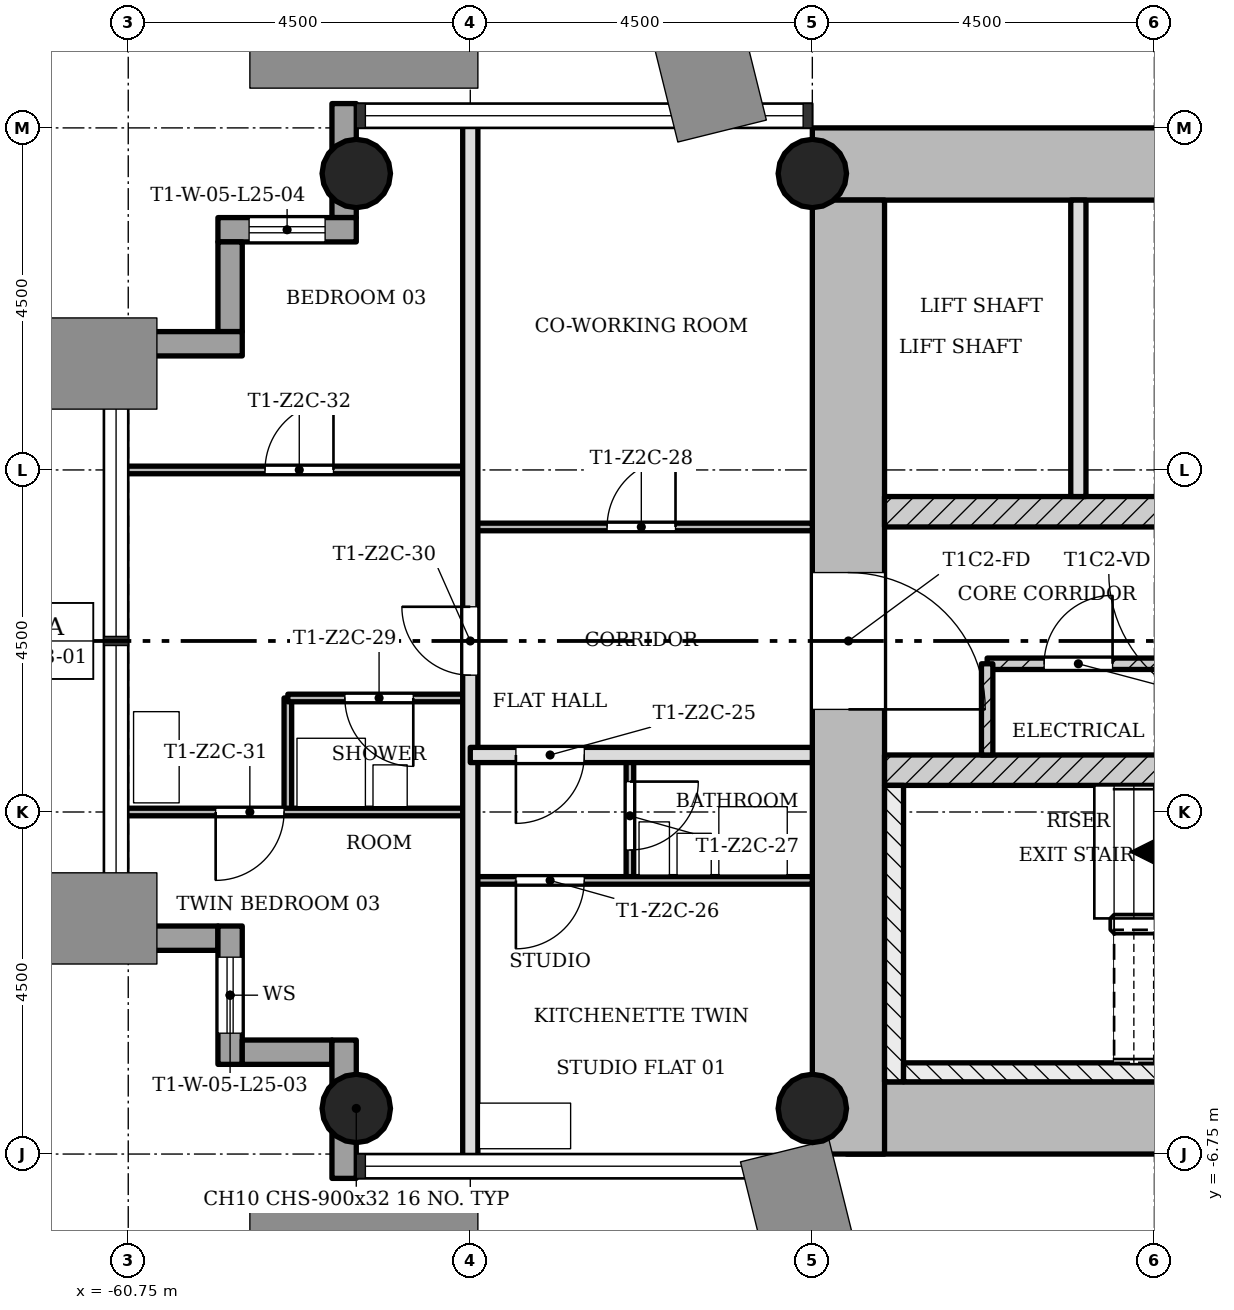
"""IFC4 building model, lengths in metres.
Left out: names, types, materials, properties, quantities, classifications, styles, units other than length and angle.
Written with IfcOpenShell. Run it as: python <this file> out.ifc"""

import sys

from ifc_helpers import new_model, si_unit, direction, frame, frame_2d, origin, origin_2d, place, context, subcontext, project, spatial, rectangle, hollow_circle, extrude, element, fill, save


model = new_model("IFC4")
c1 = context("Model", 3, precision=1e-05, world=origin(), true_north=direction((0.0, 1.0)))
c2 = subcontext(c1, "Body", "Model", "MODEL_VIEW")
j1 = project(units=[si_unit("LENGTHUNIT", "METRE"), si_unit("PLANEANGLEUNIT", "RADIAN")], contexts=[c1])
p1 = place(None, origin())
s1 = spatial("IfcSite", under=j1, at=p1, CompositionType="ELEMENT")
p2 = place(p1, origin())
s2 = spatial("IfcBuilding", under=s1, at=p2, CompositionType="ELEMENT")
p3 = place(p2, frame((0.0, 0.0, 93.6)))
s3 = spatial("IfcBuildingStorey", under=s2, at=p3, CompositionType="ELEMENT", Elevation=93.6)
p4 = place(p3, frame((-51.298, -6.275, 0.0), z_axis=(0.0, 0.0, 1.0), x_axis=(1.0, 0.0, 0.0)))
e1 = element("IfcWall", 1, at=p4, inside=s3, PredefinedType="SHEAR", context=c2, shape_type="SweptSolid", body=[
    extrude(rectangle(XDim=8.696, YDim=0.95, at=frame_2d((4.348, 0.0))), origin(), (0.0, 0.0, 1.0), 3.4),
])
p5 = place(p3, frame((-43.7, 6.275, 0.0), z_axis=(0.0, 0.0, 1.0), x_axis=(-1.0, 0.0, 0.0)))
e2 = element("IfcWall", 2, at=p5, inside=s3, PredefinedType="SHEAR", context=c2, shape_type="SweptSolid", body=[
    extrude(rectangle(XDim=8.05, YDim=0.95, at=frame_2d((4.025, 0.0))), origin(), (0.0, 0.0, 1.0), 3.4),
])
p6 = place(p3, frame((-51.275, 5.8, 0.0), z_axis=(0.0, 0.0, 1.0), x_axis=(0.0, -1.0, 0.0)))
e3 = element("IfcWall", 3, at=p6, inside=s3, PredefinedType="SHEAR", context=c2, shape_type="SweptSolid", body=[
    extrude(rectangle(XDim=12.55, YDim=0.95, at=frame_2d((6.275, 0.0))), origin(), (0.0, 0.0, 1.0), 3.4),
])
p7 = place(p6, frame((4.9, 0.0, 0.0)))
e4 = element("IfcOpeningElement", 4, at=p7, cuts=e3, PredefinedType="OPENING", context=c2, shape_type="SweptSolid", body=[
    extrude(rectangle(XDim=1.8, YDim=2.1, at=frame_2d((0.9, 1.05))), frame((0.0, 0.485, 0.0), z_axis=(0.0, -1.0, 0.0), x_axis=(1.0, 0.0, 0.0)), (0.0, 0.0, 1.0), 0.97),
])
p8 = place(p3, frame((-50.8, -1.7, 0.0), z_axis=(0.0, 0.0, 1.0), x_axis=(1.0, 0.0, 0.0)))
e5 = element("IfcWall", 5, at=p8, inside=s3, PredefinedType="SHEAR", context=c2, shape_type="SweptSolid", body=[
    extrude(rectangle(XDim=7.1, YDim=0.4, at=frame_2d((3.55, 0.0))), origin(), (0.0, 0.0, 1.0), 3.4),
])
p9 = place(p8, frame((5.5, 0.0, 0.0)))
e6 = element("IfcOpeningElement", 6, at=p9, cuts=e5, PredefinedType="OPENING", context=c2, shape_type="SweptSolid", body=[
    extrude(rectangle(XDim=0.9, YDim=2.1, at=frame_2d((0.45, 1.05))), frame((0.0, 0.21, 0.0), z_axis=(0.0, -1.0, 0.0), x_axis=(1.0, 0.0, 0.0)), (0.0, 0.0, 1.0), 0.42),
])
p10 = place(p3, frame((-50.8, 1.7, 0.0), z_axis=(0.0, 0.0, 1.0), x_axis=(1.0, 0.0, 0.0)))
e7 = element("IfcWall", 7, at=p10, inside=s3, PredefinedType="SHEAR", context=c2, shape_type="SweptSolid", body=[
    extrude(rectangle(XDim=7.1, YDim=0.4, at=frame_2d((3.55, 0.0))), origin(), (0.0, 0.0, 1.0), 3.4),
])
p11 = place(p10, frame((5.2, 0.0, 0.0)))
e8 = element("IfcOpeningElement", 8, at=p11, cuts=e7, PredefinedType="OPENING", context=c2, shape_type="SweptSolid", body=[
    extrude(rectangle(XDim=1.1, YDim=2.1, at=frame_2d((0.55, 1.05))), frame((0.0, 0.21, 0.0), z_axis=(0.0, -1.0, 0.0), x_axis=(1.0, 0.0, 0.0)), (0.0, 0.0, 1.0), 0.42),
])
for number, where, z_axis, x_axis in (
    (9, (-51.75, -6.15, 0.0), (0.0, 0.0, 1.0), (1.0, 0.0, 0.0)),
    (10, (-51.75, 6.15, 0.0), (0.0, 0.0, 1.0), (1.0, 0.0, 0.0)),
    (11, (-57.75, -6.15, 0.0), (0.0, 0.0, 1.0), (1.0, 0.0, 0.0)),
    (12, (-57.75, 6.15, 0.0), (0.0, 0.0, 1.0), (1.0, 0.0, 0.0)),
):
    element("IfcColumn", number, at=place(p3, frame(where, z_axis=z_axis, x_axis=x_axis)), inside=s3, PredefinedType="COLUMN", context=c2, shape_type="SweptSolid", body=[
        extrude(hollow_circle(Radius=0.45, WallThickness=0.032, at=origin_2d()), origin(), (0.0, 0.0, 1.0), 3.4),
    ])
p12 = place(p3, frame((-61.07, -3.91, -0.3), z_axis=(0.0, 0.0, 1.0), x_axis=(1.0, 0.0, 0.0)))
e13 = element("IfcWall", 13, at=p12, inside=s3, PredefinedType="STANDARD", context=c2, shape_type="SweptSolid", body=[
    extrude(rectangle(XDim=1.5, YDim=0.32, at=frame_2d((0.75, 0.0))), origin(), (0.0, 0.0, 1.0), 3.4),
])
p13 = place(p3, frame((-59.41, -3.75, -0.3), z_axis=(0.0, 0.0, 1.0), x_axis=(0.0, -1.0, 0.0)))
e14 = element("IfcWall", 14, at=p13, inside=s3, PredefinedType="STANDARD", context=c2, shape_type="SweptSolid", body=[
    extrude(rectangle(XDim=1.82, YDim=0.32, at=frame_2d((0.91, 0.0))), origin(), (0.0, 0.0, 1.0), 3.4),
])
p14 = place(p13, frame((0.41, 0.0, 1.2)))
e15 = element("IfcOpeningElement", 15, at=p14, cuts=e14, PredefinedType="OPENING", context=c2, shape_type="SweptSolid", body=[
    extrude(rectangle(XDim=1.0, YDim=1.5, at=frame_2d((0.5, 0.75))), frame((0.0, 0.17, 0.0), z_axis=(0.0, -1.0, 0.0), x_axis=(1.0, 0.0, 0.0)), (0.0, 0.0, 1.0), 0.34),
])
p15 = place(p3, frame((-59.25, -5.41, -0.3), z_axis=(0.0, 0.0, 1.0), x_axis=(1.0, 0.0, 0.0)))
e16 = element("IfcWall", 16, at=p15, inside=s3, PredefinedType="STANDARD", context=c2, shape_type="SweptSolid", body=[
    extrude(rectangle(XDim=1.18, YDim=0.32, at=frame_2d((0.59, 0.0))), origin(), (0.0, 0.0, 1.0), 3.4),
])
p16 = place(p3, frame((-57.91, -5.25, -0.3), z_axis=(0.0, 0.0, 1.0), x_axis=(0.0, -1.0, 0.0)))
e17 = element("IfcWall", 17, at=p16, inside=s3, PredefinedType="STANDARD", context=c2, shape_type="SweptSolid", body=[
    extrude(rectangle(XDim=1.82, YDim=0.32, at=frame_2d((0.91, 0.0))), origin(), (0.0, 0.0, 1.0), 3.4),
])
p17 = place(p3, frame((-57.91, 7.07, -0.3), z_axis=(0.0, 0.0, 1.0), x_axis=(0.0, -1.0, 0.0)))
e18 = element("IfcWall", 18, at=p17, inside=s3, PredefinedType="STANDARD", context=c2, shape_type="SweptSolid", body=[
    extrude(rectangle(XDim=1.5, YDim=0.32, at=frame_2d((0.75, 0.0))), origin(), (0.0, 0.0, 1.0), 3.4),
])
p18 = place(p3, frame((-57.75, 5.41, -0.3), z_axis=(0.0, 0.0, 1.0), x_axis=(-1.0, 0.0, 0.0)))
e19 = element("IfcWall", 19, at=p18, inside=s3, PredefinedType="STANDARD", context=c2, shape_type="SweptSolid", body=[
    extrude(rectangle(XDim=1.82, YDim=0.32, at=frame_2d((0.91, 0.0))), origin(), (0.0, 0.0, 1.0), 3.4),
])
p19 = place(p18, frame((0.41, 0.0, 1.2)))
e20 = element("IfcOpeningElement", 20, at=p19, cuts=e19, PredefinedType="OPENING", context=c2, shape_type="SweptSolid", body=[
    extrude(rectangle(XDim=1.0, YDim=1.5, at=frame_2d((0.5, 0.75))), frame((0.0, 0.17, 0.0), z_axis=(0.0, -1.0, 0.0), x_axis=(1.0, 0.0, 0.0)), (0.0, 0.0, 1.0), 0.34),
])
p20 = place(p3, frame((-59.41, 5.25, -0.3), z_axis=(0.0, 0.0, 1.0), x_axis=(0.0, -1.0, 0.0)))
e21 = element("IfcWall", 21, at=p20, inside=s3, PredefinedType="STANDARD", context=c2, shape_type="SweptSolid", body=[
    extrude(rectangle(XDim=1.18, YDim=0.32, at=frame_2d((0.59, 0.0))), origin(), (0.0, 0.0, 1.0), 3.4),
])
p21 = place(p3, frame((-59.25, 3.91, -0.3), z_axis=(0.0, 0.0, 1.0), x_axis=(-1.0, 0.0, 0.0)))
e22 = element("IfcWall", 22, at=p21, inside=s3, PredefinedType="STANDARD", context=c2, shape_type="SweptSolid", body=[
    extrude(rectangle(XDim=1.82, YDim=0.32, at=frame_2d((0.91, 0.0))), origin(), (0.0, 0.0, 1.0), 3.4),
])
p22 = place(p3, frame((-48.25, 5.8, 0.0), z_axis=(0.0, 0.0, 1.0), x_axis=(0.0, -1.0, 0.0)))
e23 = element("IfcWall", 23, at=p22, inside=s3, PredefinedType="SOLIDWALL", context=c2, shape_type="SweptSolid", body=[
    extrude(rectangle(XDim=3.9, YDim=0.2, at=frame_2d((1.95, 0.0))), origin(), (0.0, 0.0, 1.0), 3.0),
])
p23 = place(p3, frame((-47.05, -0.3, 0.0), z_axis=(0.0, 0.0, 1.0), x_axis=(-1.0, 0.0, 0.0)))
e24 = element("IfcWall", 24, at=p23, inside=s3, PredefinedType="PARTITIONING", context=c2, shape_type="SweptSolid", body=[
    extrude(rectangle(XDim=2.4, YDim=0.15, at=frame_2d((1.2, 0.0))), origin(), (0.0, 0.0, 1.0), 3.0),
])
p24 = place(p23, frame((0.75, 0.0, 0.0)))
e25 = element("IfcOpeningElement", 25, at=p24, cuts=e24, PredefinedType="OPENING", context=c2, shape_type="SweptSolid", body=[
    extrude(rectangle(XDim=0.9, YDim=2.1, at=frame_2d((0.45, 1.05))), frame((0.0, 0.085, 0.0), z_axis=(0.0, -1.0, 0.0), x_axis=(1.0, 0.0, 0.0)), (0.0, 0.0, 1.0), 0.17),
])
p25 = place(p3, frame((-49.45, -0.3, 0.0), z_axis=(0.0, 0.0, 1.0), x_axis=(0.0, -1.0, 0.0)))
e26 = element("IfcWall", 26, at=p25, inside=s3, PredefinedType="PARTITIONING", context=c2, shape_type="SweptSolid", body=[
    extrude(rectangle(XDim=1.2, YDim=0.15, at=frame_2d((0.6, 0.0))), origin(), (0.0, 0.0, 1.0), 3.0),
])
p26 = place(p3, frame((-58.65, -2.25, 0.0), z_axis=(0.0, 0.0, 1.0), x_axis=(0.0, 1.0, 0.0)))
e27 = element("IfcWall", 27, at=p26, inside=s3, PredefinedType="PARTITIONING", context=c2, shape_type="SweptSolid", body=[
    extrude(rectangle(XDim=1.5, YDim=0.1, at=frame_2d((0.75, 0.0))), origin(), (0.0, 0.0, 1.0), 3.0),
])
p27 = place(p3, frame((-56.25, -6.85, 0.0), z_axis=(0.0, 0.0, 1.0), x_axis=(0.0, 1.0, 0.0)))
e28 = element("IfcWall", 28, at=p27, inside=s3, PredefinedType="SOLIDWALL", context=c2, shape_type="SweptSolid", body=[
    extrude(rectangle(XDim=13.7, YDim=0.2, at=frame_2d((6.85, 0.0))), origin(), (0.0, 0.0, 1.0), 3.0),
])
p28 = place(p27, frame((6.4, 0.0, 0.0)))
e29 = element("IfcOpeningElement", 29, at=p28, cuts=e28, PredefinedType="OPENING", context=c2, shape_type="SweptSolid", body=[
    extrude(rectangle(XDim=0.9, YDim=2.1, at=frame_2d((0.45, 1.05))), frame((0.0, 0.11, 0.0), z_axis=(0.0, -1.0, 0.0), x_axis=(1.0, 0.0, 0.0)), (0.0, 0.0, 1.0), 0.22),
])
p29 = place(p3, frame((-54.15, -3.15, 0.0), z_axis=(0.0, 0.0, 1.0), x_axis=(0.0, 1.0, 0.0)))
e30 = element("IfcWall", 30, at=p29, inside=s3, PredefinedType="PARTITIONING", context=c2, shape_type="SweptSolid", body=[
    extrude(rectangle(XDim=1.65, YDim=0.1, at=frame_2d((0.825, 0.0))), origin(), (0.0, 0.0, 1.0), 3.0),
])
p30 = place(p29, frame((0.4, 0.0, 0.0)))
e31 = element("IfcOpeningElement", 31, at=p30, cuts=e30, PredefinedType="OPENING", context=c2, shape_type="SweptSolid", body=[
    extrude(rectangle(XDim=0.9, YDim=2.1, at=frame_2d((0.45, 1.05))), frame((0.0, 0.06, 0.0), z_axis=(0.0, -1.0, 0.0), x_axis=(1.0, 0.0, 0.0)), (0.0, 0.0, 1.0), 0.12),
])
p31 = place(p3, frame((-56.25, -3.15, 0.0), z_axis=(0.0, 0.0, 1.0), x_axis=(1.0, 0.0, 0.0)))
e32 = element("IfcWall", 32, at=p31, inside=s3, PredefinedType="PARTITIONING", context=c2, shape_type="SweptSolid", body=[
    extrude(rectangle(XDim=4.5, YDim=0.1, at=frame_2d((2.25, 0.0))), origin(), (0.0, 0.0, 1.0), 3.0),
])
p32 = place(p31, frame((0.6, 0.0, 0.0)))
e33 = element("IfcOpeningElement", 33, at=p32, cuts=e32, PredefinedType="OPENING", context=c2, shape_type="SweptSolid", body=[
    extrude(rectangle(XDim=0.9, YDim=2.1, at=frame_2d((0.45, 1.05))), frame((0.0, 0.06, 0.0), z_axis=(0.0, -1.0, 0.0), x_axis=(1.0, 0.0, 0.0)), (0.0, 0.0, 1.0), 0.12),
])
p33 = place(p3, frame((-60.85, -2.25, 0.0), z_axis=(0.0, 0.0, 1.0), x_axis=(1.0, 0.0, 0.0)))
e34 = element("IfcWall", 34, at=p33, inside=s3, PredefinedType="PARTITIONING", context=c2, shape_type="SweptSolid", body=[
    extrude(rectangle(XDim=4.6, YDim=0.1, at=frame_2d((2.3, 0.0))), origin(), (0.0, 0.0, 1.0), 3.0),
])
p34 = place(p33, frame((1.25, 0.0, 0.0)))
e35 = element("IfcOpeningElement", 35, at=p34, cuts=e34, PredefinedType="OPENING", context=c2, shape_type="SweptSolid", body=[
    extrude(rectangle(XDim=0.9, YDim=2.1, at=frame_2d((0.45, 1.05))), frame((0.0, 0.06, 0.0), z_axis=(0.0, -1.0, 0.0), x_axis=(1.0, 0.0, 0.0)), (0.0, 0.0, 1.0), 0.12),
])
p35 = place(p3, frame((-56.25, -1.5, 0.0), z_axis=(0.0, 0.0, 1.0), x_axis=(1.0, 0.0, 0.0)))
e36 = element("IfcWall", 36, at=p35, inside=s3, PredefinedType="SOLIDWALL", context=c2, shape_type="SweptSolid", body=[
    extrude(rectangle(XDim=4.5, YDim=0.2, at=frame_2d((2.25, 0.0))), origin(), (0.0, 0.0, 1.0), 3.0),
])
p36 = place(p35, frame((0.6, 0.0, 0.0)))
e37 = element("IfcOpeningElement", 37, at=p36, cuts=e36, PredefinedType="OPENING", context=c2, shape_type="SweptSolid", body=[
    extrude(rectangle(XDim=0.9, YDim=2.1, at=frame_2d((0.45, 1.05))), frame((0.0, 0.11, 0.0), z_axis=(0.0, -1.0, 0.0), x_axis=(1.0, 0.0, 0.0)), (0.0, 0.0, 1.0), 0.22),
])
p37 = place(p3, frame((-58.65, -0.75, 0.0), z_axis=(0.0, 0.0, 1.0), x_axis=(1.0, 0.0, 0.0)))
e38 = element("IfcWall", 38, at=p37, inside=s3, PredefinedType="PARTITIONING", context=c2, shape_type="SweptSolid", body=[
    extrude(rectangle(XDim=2.4, YDim=0.1, at=frame_2d((1.2, 0.0))), origin(), (0.0, 0.0, 1.0), 3.0),
])
p38 = place(p37, frame((0.75, 0.0, 0.0)))
e39 = element("IfcOpeningElement", 39, at=p38, cuts=e38, PredefinedType="OPENING", context=c2, shape_type="SweptSolid", body=[
    extrude(rectangle(XDim=0.9, YDim=2.1, at=frame_2d((0.45, 1.05))), frame((0.0, 0.06, 0.0), z_axis=(0.0, -1.0, 0.0), x_axis=(1.0, 0.0, 0.0)), (0.0, 0.0, 1.0), 0.12),
])
p39 = place(p3, frame((-56.25, 1.5, 0.0), z_axis=(0.0, 0.0, 1.0), x_axis=(1.0, 0.0, 0.0)))
e40 = element("IfcWall", 40, at=p39, inside=s3, PredefinedType="PARTITIONING", context=c2, shape_type="SweptSolid", body=[
    extrude(rectangle(XDim=4.5, YDim=0.1, at=frame_2d((2.25, 0.0))), origin(), (0.0, 0.0, 1.0), 3.0),
])
p40 = place(p39, frame((1.8, 0.0, 0.0)))
e41 = element("IfcOpeningElement", 41, at=p40, cuts=e40, PredefinedType="OPENING", context=c2, shape_type="SweptSolid", body=[
    extrude(rectangle(XDim=0.9, YDim=2.1, at=frame_2d((0.45, 1.05))), frame((0.0, 0.06, 0.0), z_axis=(0.0, -1.0, 0.0), x_axis=(1.0, 0.0, 0.0)), (0.0, 0.0, 1.0), 0.12),
])
p41 = place(p3, frame((-60.85, 2.25, 0.0), z_axis=(0.0, 0.0, 1.0), x_axis=(1.0, 0.0, 0.0)))
e42 = element("IfcWall", 42, at=p41, inside=s3, PredefinedType="PARTITIONING", context=c2, shape_type="SweptSolid", body=[
    extrude(rectangle(XDim=4.6, YDim=0.1, at=frame_2d((2.3, 0.0))), origin(), (0.0, 0.0, 1.0), 3.0),
])
p42 = place(p41, frame((1.9, 0.0, 0.0)))
e43 = element("IfcOpeningElement", 43, at=p42, cuts=e42, PredefinedType="OPENING", context=c2, shape_type="SweptSolid", body=[
    extrude(rectangle(XDim=0.9, YDim=2.1, at=frame_2d((0.45, 1.05))), frame((0.0, 0.06, 0.0), z_axis=(0.0, -1.0, 0.0), x_axis=(1.0, 0.0, 0.0)), (0.0, 0.0, 1.0), 0.12),
])
p43 = place(p3, frame((-50.675, -1.9, 0.0), z_axis=(0.0, 0.0, 1.0), x_axis=(0.0, -1.0, 0.0)))
e44 = element("IfcWall", 44, at=p43, inside=s3, PredefinedType="SHEAR", context=c2, shape_type="SweptSolid", body=[
    extrude(rectangle(XDim=3.9, YDim=0.25, at=frame_2d((1.95, 0.0))), origin(), (0.0, 0.0, 1.0), 3.4),
])
p44 = place(p3, frame((-43.95, -5.675, 0.0), z_axis=(0.0, 0.0, 1.0), x_axis=(-1.0, 0.0, 0.0)))
e45 = element("IfcWall", 45, at=p44, inside=s3, PredefinedType="SHEAR", context=c2, shape_type="SweptSolid", body=[
    extrude(rectangle(XDim=6.6, YDim=0.25, at=frame_2d((3.3, 0.0))), origin(), (0.0, 0.0, 1.0), 3.4),
])
p45 = place(p24, origin())
e46 = element("IfcDoor", 46, at=p45, inside=s3, OperationType="SINGLE_SWING_LEFT", PredefinedType="DOOR", context=c2, shape_type="SweptSolid", body=[
    extrude(rectangle(XDim=0.9, YDim=2.1, at=frame_2d((0.45, 1.05))), frame((0.0, 0.025, 0.0), z_axis=(0.0, -1.0, 0.0), x_axis=(1.0, 0.0, 0.0)), (0.0, 0.0, 1.0), 0.05),
])
fill(e25, e46)
p46 = place(p36, origin())
e47 = element("IfcDoor", 47, at=p46, inside=s3, OperationType="SINGLE_SWING_LEFT", PredefinedType="DOOR", context=c2, shape_type="SweptSolid", body=[
    extrude(rectangle(XDim=0.9, YDim=2.1, at=frame_2d((0.45, 1.05))), frame((0.0, 0.025, 0.0), z_axis=(0.0, -1.0, 0.0), x_axis=(1.0, 0.0, 0.0)), (0.0, 0.0, 1.0), 0.05),
])
fill(e37, e47)
p47 = place(p32, origin())
e48 = element("IfcDoor", 48, at=p47, inside=s3, OperationType="SINGLE_SWING_LEFT", PredefinedType="DOOR", context=c2, shape_type="SweptSolid", body=[
    extrude(rectangle(XDim=0.9, YDim=2.1, at=frame_2d((0.45, 1.05))), frame((0.0, 0.025, 0.0), z_axis=(0.0, -1.0, 0.0), x_axis=(1.0, 0.0, 0.0)), (0.0, 0.0, 1.0), 0.05),
])
fill(e33, e48)
p48 = place(p30, origin())
e49 = element("IfcDoor", 49, at=p48, inside=s3, OperationType="SINGLE_SWING_RIGHT", PredefinedType="DOOR", context=c2, shape_type="SweptSolid", body=[
    extrude(rectangle(XDim=0.9, YDim=2.1, at=frame_2d((0.45, 1.05))), frame((0.0, 0.025, 0.0), z_axis=(0.0, -1.0, 0.0), x_axis=(1.0, 0.0, 0.0)), (0.0, 0.0, 1.0), 0.05),
])
fill(e31, e49)
p49 = place(p40, origin())
e50 = element("IfcDoor", 50, at=p49, inside=s3, OperationType="SINGLE_SWING_LEFT", PredefinedType="DOOR", context=c2, shape_type="SweptSolid", body=[
    extrude(rectangle(XDim=0.9, YDim=2.1, at=frame_2d((0.45, 1.05))), frame((0.0, 0.025, 0.0), z_axis=(0.0, -1.0, 0.0), x_axis=(1.0, 0.0, 0.0)), (0.0, 0.0, 1.0), 0.05),
])
fill(e41, e50)
p50 = place(p38, origin())
e51 = element("IfcDoor", 51, at=p50, inside=s3, OperationType="SINGLE_SWING_RIGHT", PredefinedType="DOOR", context=c2, shape_type="SweptSolid", body=[
    extrude(rectangle(XDim=0.9, YDim=2.1, at=frame_2d((0.45, 1.05))), frame((0.0, 0.025, 0.0), z_axis=(0.0, -1.0, 0.0), x_axis=(1.0, 0.0, 0.0)), (0.0, 0.0, 1.0), 0.05),
])
fill(e39, e51)
p51 = place(p28, origin())
e52 = element("IfcDoor", 52, at=p51, inside=s3, OperationType="SINGLE_SWING_LEFT", PredefinedType="DOOR", context=c2, shape_type="SweptSolid", body=[
    extrude(rectangle(XDim=0.9, YDim=2.1, at=frame_2d((0.45, 1.05))), frame((0.0, 0.025, 0.0), z_axis=(0.0, -1.0, 0.0), x_axis=(1.0, 0.0, 0.0)), (0.0, 0.0, 1.0), 0.05),
])
fill(e29, e52)
p52 = place(p34, origin())
e53 = element("IfcDoor", 53, at=p52, inside=s3, OperationType="SINGLE_SWING_LEFT", PredefinedType="DOOR", context=c2, shape_type="SweptSolid", body=[
    extrude(rectangle(XDim=0.9, YDim=2.1, at=frame_2d((0.45, 1.05))), frame((0.0, 0.025, 0.0), z_axis=(0.0, -1.0, 0.0), x_axis=(1.0, 0.0, 0.0)), (0.0, 0.0, 1.0), 0.05),
])
fill(e35, e53)
p53 = place(p42, origin())
e54 = element("IfcDoor", 54, at=p53, inside=s3, OperationType="SINGLE_SWING_LEFT", PredefinedType="DOOR", context=c2, shape_type="SweptSolid", body=[
    extrude(rectangle(XDim=0.9, YDim=2.1, at=frame_2d((0.45, 1.05))), frame((0.0, 0.025, 0.0), z_axis=(0.0, -1.0, 0.0), x_axis=(1.0, 0.0, 0.0)), (0.0, 0.0, 1.0), 0.05),
])
fill(e43, e54)
p54 = place(p7, origin())
e55 = element("IfcDoor", 55, at=p54, inside=s3, OperationType="SINGLE_SWING_LEFT", PredefinedType="DOOR", context=c2, shape_type="SweptSolid", body=[
    extrude(rectangle(XDim=1.8, YDim=2.1, at=frame_2d((0.9, 1.05))), frame((0.0, 0.025, 0.0), z_axis=(0.0, -1.0, 0.0), x_axis=(1.0, 0.0, 0.0)), (0.0, 0.0, 1.0), 0.05),
])
fill(e4, e55)
p55 = place(p14, origin())
e56 = element("IfcWindow", 56, at=p55, inside=s3, PartitioningType="SINGLE_PANEL", PredefinedType="WINDOW", context=c2, shape_type="SweptSolid", body=[
    extrude(rectangle(XDim=1.0, YDim=1.5, at=frame_2d((0.5, 0.75))), frame((0.0, 0.03, 0.0), z_axis=(0.0, -1.0, 0.0), x_axis=(1.0, 0.0, 0.0)), (0.0, 0.0, 1.0), 0.06),
])
fill(e15, e56)
p56 = place(p19, origin())
e57 = element("IfcWindow", 57, at=p56, inside=s3, PartitioningType="SINGLE_PANEL", PredefinedType="WINDOW", context=c2, shape_type="SweptSolid", body=[
    extrude(rectangle(XDim=1.0, YDim=1.5, at=frame_2d((0.5, 0.75))), frame((0.0, 0.03, 0.0), z_axis=(0.0, -1.0, 0.0), x_axis=(1.0, 0.0, 0.0)), (0.0, 0.0, 1.0), 0.06),
])
fill(e20, e57)
save(model, sys.argv[1])
